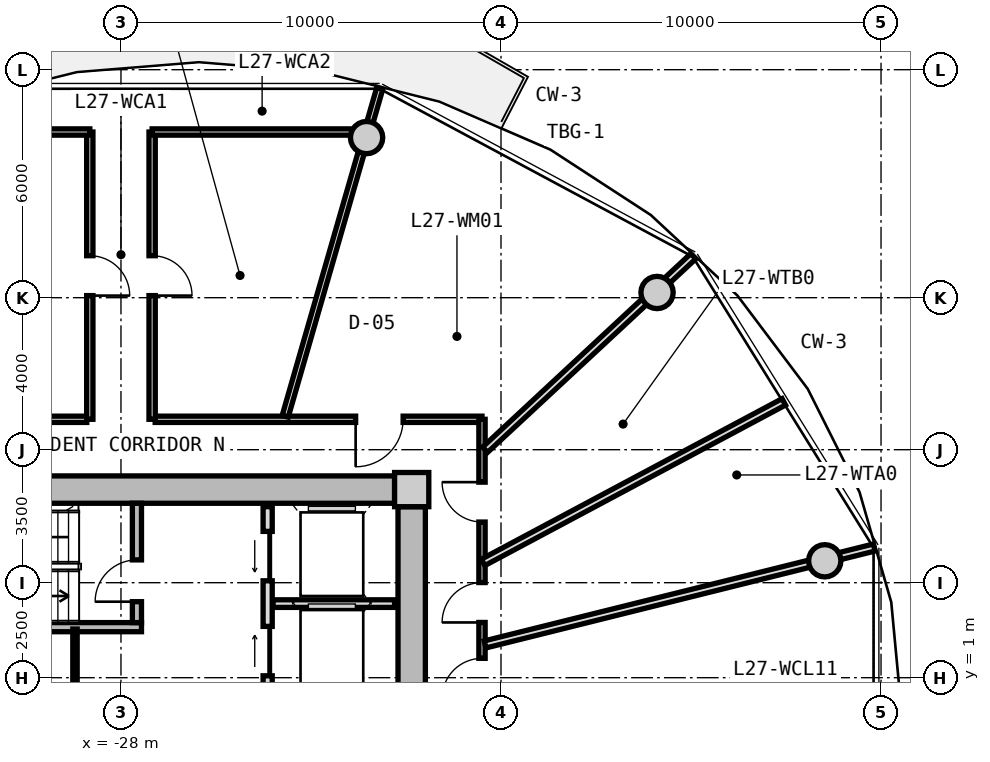
"""IFC4 building model, lengths in metres.
Left out: names, types, materials, properties, quantities, classifications, styles, units other than length and angle.
Written with IfcOpenShell. Run it as: python <this file> out.ifc"""

import sys

from ifc_helpers import new_model, si_unit, direction, frame, frame_2d, origin, origin_2d, place, context, subcontext, project, spatial, rectangle, circle, extrude, source, transform, mapped, element, fill, save


model = new_model("IFC4")
c1 = context("Model", 3, precision=1e-05, world=origin(), true_north=direction((0.0, 1.0)))
c2 = subcontext(c1, "Body", "Model", "MODEL_VIEW")
j1 = project(units=[si_unit("LENGTHUNIT", "METRE"), si_unit("PLANEANGLEUNIT", "RADIAN")], contexts=[c1])
p1 = place(None, origin())
s1 = spatial("IfcSite", under=j1, at=p1, CompositionType="ELEMENT")
p2 = place(p1, origin())
s2 = spatial("IfcBuilding", under=s1, at=p2, CompositionType="ELEMENT")
p3 = place(p2, frame((0.0, 0.0, 90.15)))
s3 = spatial("IfcBuildingStorey", under=s2, at=p3, CompositionType="ELEMENT", Elevation=90.15)
m1 = source(origin(), c2, "Body", "SweptSolid", [
    extrude(rectangle(XDim=0.9, YDim=0.9, at=origin_2d()), origin(), (0.0, 0.0, 1.0), 3.05),
])
p4 = place(p3, frame((-20.35, 5.95, 0.0), z_axis=(0.0, 0.0, 1.0), x_axis=(1.0, 0.0, 0.0)))
e1 = element("IfcColumn", 1, at=p4, inside=s3, PredefinedType="COLUMN", context=c2, shape_type="MappedRepresentation", body=[
    mapped(m1, transform((0.0, 0.0, 0.0), x_axis=(1.0, 0.0, 0.0), y_axis=(0.0, 1.0, 0.0), z_axis=(0.0, 0.0, 1.0), scale=1.0)),
])
m2 = source(origin(), c2, "Body", "SweptSolid", [
    extrude(rectangle(XDim=14.4, YDim=0.72, at=frame_2d((7.2, 0.0))), origin(), (0.0, 0.0, 1.0), 2.79),
])
p5 = place(p3, frame((-35.2, 5.95, 0.0), z_axis=(0.0, 0.0, 1.0), x_axis=(1.0, 0.0, 0.0)))
e2 = element("IfcWall", 2, at=p5, inside=s3, PredefinedType="SHEAR", context=c2, shape_type="MappedRepresentation", body=[
    mapped(m2, transform((0.0, 0.0, 0.0), x_axis=(1.0, 0.0, 0.0), y_axis=(0.0, 1.0, 0.0), z_axis=(0.0, 0.0, 1.0), scale=1.0)),
])
m3 = source(origin(), c2, "Body", "SweptSolid", [
    extrude(rectangle(XDim=11.0, YDim=0.72, at=frame_2d((5.5, 0.0))), origin(), (0.0, 0.0, 1.0), 2.79),
])
p6 = place(p3, frame((-20.35, 5.5, 0.0), z_axis=(0.0, 0.0, 1.0), x_axis=(0.0, -1.0, 0.0)))
e3 = element("IfcWall", 3, at=p6, inside=s3, PredefinedType="SHEAR", context=c2, shape_type="MappedRepresentation", body=[
    mapped(m3, transform((0.0, 0.0, 0.0), x_axis=(1.0, 0.0, 0.0), y_axis=(0.0, 1.0, 0.0), z_axis=(0.0, 0.0, 1.0), scale=1.0)),
])
p7 = place(p6, frame((5.65, 0.0, 0.0)))
e4 = element("IfcOpeningElement", 4, at=p7, cuts=e3, PredefinedType="OPENING", context=c2, shape_type="SweptSolid", body=[
    extrude(rectangle(XDim=1.2, YDim=2.15, at=frame_2d((0.6, 1.075))), frame((0.0, 0.37, 0.0), z_axis=(0.0, -1.0, 0.0), x_axis=(1.0, 0.0, 0.0)), (0.0, 0.0, 1.0), 0.74),
])
m4 = source(origin(), c2, "Body", "SweptSolid", [
    extrude(circle(Radius=0.425, at=origin_2d()), origin(), (0.0, 0.0, 1.0), 3.05),
])
for number, where, z_axis, x_axis in (
    (5, (-9.481, 4.076, 0.0), (0.0, 0.0, 1.0), (1.0, 0.0, 0.0)),
    (6, (-13.894, 11.137, 0.0), (0.0, 0.0, 1.0), (1.0, 0.0, 0.0)),
    (7, (-21.537, 15.213, 0.0), (0.0, 0.0, 1.0), (1.0, 0.0, 0.0)),
):
    element("IfcColumn", number, at=place(p3, frame(where, z_axis=z_axis, x_axis=x_axis)), inside=s3, PredefinedType="COLUMN", context=c2, shape_type="MappedRepresentation", body=[
        mapped(m4, transform((0.0, 0.0, 0.0), x_axis=(1.0, 0.0, 0.0), y_axis=(0.0, 1.0, 0.0), z_axis=(0.0, 0.0, 1.0), scale=1.0)),
    ])
m5 = source(origin(), c2, "Body", "SweptSolid", [
    extrude(rectangle(XDim=7.83, YDim=0.24, at=frame_2d((3.915, 0.0))), origin(), (0.0, 0.0, 1.0), 2.79),
])
p8 = place(p3, frame((-35.29, 2.33, 0.0), z_axis=(0.0, 0.0, 1.0), x_axis=(1.0, 0.0, 0.0)))
e8 = element("IfcWall", 8, at=p8, inside=s3, PredefinedType="PARTITIONING", context=c2, shape_type="MappedRepresentation", body=[
    mapped(m5, transform((0.0, 0.0, 0.0), x_axis=(1.0, 0.0, 0.0), y_axis=(0.0, 1.0, 0.0), z_axis=(0.0, 0.0, 1.0), scale=1.0)),
])
m6 = source(origin(), c2, "Body", "SweptSolid", [
    extrude(rectangle(XDim=3.14, YDim=0.24, at=frame_2d((1.57, 0.0))), origin(), (0.0, 0.0, 1.0), 2.79),
])
p9 = place(p3, frame((-27.58, 2.45, 0.0), z_axis=(0.0, 0.0, 1.0), x_axis=(0.0, 1.0, 0.0)))
e9 = element("IfcWall", 9, at=p9, inside=s3, PredefinedType="PARTITIONING", context=c2, shape_type="MappedRepresentation", body=[
    mapped(m6, transform((0.0, 0.0, 0.0), x_axis=(1.0, 0.0, 0.0), y_axis=(0.0, 1.0, 0.0), z_axis=(0.0, 0.0, 1.0), scale=1.0)),
])
p10 = place(p9, frame((0.55, 0.0, 0.0)))
e10 = element("IfcOpeningElement", 10, at=p10, cuts=e9, PredefinedType="OPENING", context=c2, shape_type="SweptSolid", body=[
    extrude(rectangle(XDim=1.1, YDim=2.15, at=frame_2d((0.55, 1.075))), frame((0.0, 0.13, 0.0), z_axis=(0.0, -1.0, 0.0), x_axis=(1.0, 0.0, 0.0)), (0.0, 0.0, 1.0), 0.26),
])
m7 = source(origin(), c2, "Body", "SweptSolid", [
    extrude(rectangle(XDim=5.0, YDim=0.24, at=frame_2d((2.5, 0.0))), origin(), (0.0, 0.0, 1.0), 2.775),
])
p11 = place(p3, frame((-24.14, 0.5, 0.0), z_axis=(0.0, 0.0, 1.0), x_axis=(0.0, 1.0, 0.0)))
e11 = element("IfcWall", 11, at=p11, inside=s3, PredefinedType="PARTITIONING", context=c2, shape_type="MappedRepresentation", body=[
    mapped(m7, transform((0.0, 0.0, 0.0), x_axis=(1.0, 0.0, 0.0), y_axis=(0.0, 1.0, 0.0), z_axis=(0.0, 0.0, 1.0), scale=1.0)),
])
p12 = place(p11, frame((3.05, 0.0, 0.0)))
e12 = element("IfcOpeningElement", 12, at=p12, cuts=e11, PredefinedType="OPENING", context=c2, shape_type="SweptSolid", body=[
    extrude(rectangle(XDim=1.3, YDim=2.2, at=frame_2d((0.65, 1.1))), frame((0.0, 0.13, 0.0), z_axis=(0.0, -1.0, 0.0), x_axis=(1.0, 0.0, 0.0)), (0.0, 0.0, 1.0), 0.26),
])
p13 = place(p11, frame((0.55, 0.0, 0.0)))
e13 = element("IfcOpeningElement", 13, at=p13, cuts=e11, PredefinedType="OPENING", context=c2, shape_type="SweptSolid", body=[
    extrude(rectangle(XDim=1.3, YDim=2.2, at=frame_2d((0.65, 1.1))), frame((0.0, 0.13, 0.0), z_axis=(0.0, -1.0, 0.0), x_axis=(1.0, 0.0, 0.0)), (0.0, 0.0, 1.0), 0.26),
])
m8 = source(origin(), c2, "Body", "SweptSolid", [
    extrude(rectangle(XDim=3.2, YDim=0.2, at=frame_2d((1.6, 0.0))), origin(), (0.0, 0.0, 1.0), 2.775),
])
p14 = place(p3, frame((-24.0, 2.95, 0.0), z_axis=(0.0, 0.0, 1.0), x_axis=(1.0, 0.0, 0.0)))
e14 = element("IfcWall", 14, at=p14, inside=s3, PredefinedType="PARTITIONING", context=c2, shape_type="MappedRepresentation", body=[
    mapped(m8, transform((0.0, 0.0, 0.0), x_axis=(1.0, 0.0, 0.0), y_axis=(0.0, 1.0, 0.0), z_axis=(0.0, 0.0, 1.0), scale=1.0)),
])
m9 = source(origin(), c2, "Body", "SweptSolid", [
    extrude(rectangle(XDim=2.33, YDim=0.115, at=frame_2d((1.165, 0.0))), origin(), (0.0, 0.0, 1.0), 2.775),
])
p15 = place(p3, frame((-29.21, -0.05, 0.0), z_axis=(0.0, 0.0, 1.0), x_axis=(0.0, 1.0, 0.0)))
e15 = element("IfcWall", 15, at=p15, inside=s3, PredefinedType="PARTITIONING", context=c2, shape_type="MappedRepresentation", body=[
    mapped(m9, transform((0.0, 0.0, 0.0), x_axis=(1.0, 0.0, 0.0), y_axis=(0.0, 1.0, 0.0), z_axis=(0.0, 0.0, 1.0), scale=1.0)),
])
m10 = source(origin(), c2, "Body", "SweptSolid", [
    extrude(rectangle(XDim=8.6, YDim=0.165, at=frame_2d((4.3, 0.0))), origin(), (0.0, 0.0, 1.0), 2.775),
])
p16 = place(p3, frame((-37.5, 7.8, 0.0), z_axis=(0.0, 0.0, 1.0), x_axis=(1.0, 0.0, 0.0)))
e16 = element("IfcWall", 16, at=p16, inside=s3, PredefinedType="PARTITIONING", context=c2, shape_type="MappedRepresentation", body=[
    mapped(m10, transform((0.0, 0.0, 0.0), x_axis=(1.0, 0.0, 0.0), y_axis=(0.0, 1.0, 0.0), z_axis=(0.0, 0.0, 1.0), scale=1.0)),
])
p17 = place(p3, frame((-27.1, 7.8, 0.0), z_axis=(0.0, 0.0, 1.0), x_axis=(1.0, 0.0, 0.0)))
e17 = element("IfcWall", 17, at=p17, inside=s3, PredefinedType="PARTITIONING", context=c2, shape_type="MappedRepresentation", body=[
    mapped(m10, transform((0.0, 0.0, 0.0), x_axis=(1.0, 0.0, 0.0), y_axis=(0.0, 1.0, 0.0), z_axis=(0.0, 0.0, 1.0), scale=1.0)),
])
p18 = place(p17, frame((5.275, 0.0, 0.0)))
e18 = element("IfcOpeningElement", 18, at=p18, cuts=e17, PredefinedType="OPENING", context=c2, shape_type="SweptSolid", body=[
    extrude(rectangle(XDim=1.25, YDim=2.2, at=frame_2d((0.625, 1.1))), frame((0.0, 0.093, 0.0), z_axis=(0.0, -1.0, 0.0), x_axis=(1.0, 0.0, 0.0)), (0.0, 0.0, 1.0), 0.185),
])
m11 = source(origin(), c2, "Body", "SweptSolid", [
    extrude(rectangle(XDim=15.6, YDim=0.165, at=frame_2d((7.8, 0.0))), origin(), (0.0, 0.0, 1.0), 2.775),
])
p19 = place(p3, frame((-18.5, 7.8, 0.0), z_axis=(0.0, 0.0, 1.0), x_axis=(0.0, -1.0, 0.0)))
e19 = element("IfcWall", 19, at=p19, inside=s3, PredefinedType="PARTITIONING", context=c2, shape_type="MappedRepresentation", body=[
    mapped(m11, transform((0.0, 0.0, 0.0), x_axis=(1.0, 0.0, 0.0), y_axis=(0.0, 1.0, 0.0), z_axis=(0.0, 0.0, 1.0), scale=1.0)),
])
p20 = place(p19, frame((12.002, 0.0, 0.0)))
e20 = element("IfcOpeningElement", 20, at=p20, cuts=e19, PredefinedType="OPENING", context=c2, shape_type="SweptSolid", body=[
    extrude(rectangle(XDim=1.05, YDim=2.15, at=frame_2d((0.525, 1.075))), frame((0.0, 0.093, 0.0), z_axis=(0.0, -1.0, 0.0), x_axis=(1.0, 0.0, 0.0)), (0.0, 0.0, 1.0), 0.185),
])
p21 = place(p19, frame((10.211, 0.0, 0.0)))
e21 = element("IfcOpeningElement", 21, at=p21, cuts=e19, PredefinedType="OPENING", context=c2, shape_type="SweptSolid", body=[
    extrude(rectangle(XDim=1.05, YDim=2.15, at=frame_2d((0.525, 1.075))), frame((0.0, 0.093, 0.0), z_axis=(0.0, -1.0, 0.0), x_axis=(1.0, 0.0, 0.0)), (0.0, 0.0, 1.0), 0.185),
])
p22 = place(p19, frame((7.722, 0.0, 0.0)))
e22 = element("IfcOpeningElement", 22, at=p22, cuts=e19, PredefinedType="OPENING", context=c2, shape_type="SweptSolid", body=[
    extrude(rectangle(XDim=1.05, YDim=2.15, at=frame_2d((0.525, 1.075))), frame((0.0, 0.093, 0.0), z_axis=(0.0, -1.0, 0.0), x_axis=(1.0, 0.0, 0.0)), (0.0, 0.0, 1.0), 0.185),
])
p23 = place(p19, frame((6.291, 0.0, 0.0)))
e23 = element("IfcOpeningElement", 23, at=p23, cuts=e19, PredefinedType="OPENING", context=c2, shape_type="SweptSolid", body=[
    extrude(rectangle(XDim=1.05, YDim=2.15, at=frame_2d((0.525, 1.075))), frame((0.0, 0.093, 0.0), z_axis=(0.0, -1.0, 0.0), x_axis=(1.0, 0.0, 0.0)), (0.0, 0.0, 1.0), 0.185),
])
p24 = place(p19, frame((4.296, 0.0, 0.0)))
e24 = element("IfcOpeningElement", 24, at=p24, cuts=e19, PredefinedType="OPENING", context=c2, shape_type="SweptSolid", body=[
    extrude(rectangle(XDim=1.05, YDim=2.15, at=frame_2d((0.525, 1.075))), frame((0.0, 0.093, 0.0), z_axis=(0.0, -1.0, 0.0), x_axis=(1.0, 0.0, 0.0)), (0.0, 0.0, 1.0), 0.185),
])
p25 = place(p19, frame((1.654, 0.0, 0.0)))
e25 = element("IfcOpeningElement", 25, at=p25, cuts=e19, PredefinedType="OPENING", context=c2, shape_type="SweptSolid", body=[
    extrude(rectangle(XDim=1.05, YDim=2.15, at=frame_2d((0.525, 1.075))), frame((0.0, 0.093, 0.0), z_axis=(0.0, -1.0, 0.0), x_axis=(1.0, 0.0, 0.0)), (0.0, 0.0, 1.0), 0.185),
])
m12 = source(origin(), c2, "Body", "SweptSolid", [
    extrude(rectangle(XDim=8.989, YDim=0.165, at=frame_2d((4.495, 0.0))), origin(), (0.0, 0.0, 1.0), 2.275),
])
p26 = place(p3, frame((-23.678, 7.88, 0.0), z_axis=(0.0, 0.0, 1.0), x_axis=(0.27702323008, 0.960863221274, 0.0)))
e26 = element("IfcWall", 26, at=p26, inside=s3, PredefinedType="PARTITIONING", context=c2, shape_type="MappedRepresentation", body=[
    mapped(m12, transform((0.0, 0.0, 0.0), x_axis=(1.0, 0.0, 0.0), y_axis=(0.0, 1.0, 0.0), z_axis=(0.0, 0.0, 1.0), scale=1.0)),
])
m13 = source(origin(), c2, "Body", "SweptSolid", [
    extrude(rectangle(XDim=7.56, YDim=0.165, at=frame_2d((3.78, 0.0))), origin(), (0.0, 0.0, 1.0), 2.775),
])
p27 = place(p3, frame((-28.82, 7.8, 0.0), z_axis=(0.0, 0.0, 1.0), x_axis=(0.0, 1.0, 0.0)))
e27 = element("IfcWall", 27, at=p27, inside=s3, PredefinedType="PARTITIONING", context=c2, shape_type="MappedRepresentation", body=[
    mapped(m13, transform((0.0, 0.0, 0.0), x_axis=(1.0, 0.0, 0.0), y_axis=(0.0, 1.0, 0.0), z_axis=(0.0, 0.0, 1.0), scale=1.0)),
])
p28 = place(p27, frame((3.255, 0.0, 0.0)))
e28 = element("IfcOpeningElement", 28, at=p28, cuts=e27, PredefinedType="OPENING", context=c2, shape_type="SweptSolid", body=[
    extrude(rectangle(XDim=1.05, YDim=2.15, at=frame_2d((0.525, 1.075))), frame((0.0, 0.093, 0.0), z_axis=(0.0, -1.0, 0.0), x_axis=(1.0, 0.0, 0.0)), (0.0, 0.0, 1.0), 0.185),
])
m14 = source(origin(), c2, "Body", "SweptSolid", [
    extrude(rectangle(XDim=4.307, YDim=0.165, at=frame_2d((2.153, 0.0))), origin(), (0.0, 0.0, 1.0), 2.275),
])
p29 = place(p3, frame((-33.127, 15.36, 0.0), z_axis=(0.0, 0.0, 1.0), x_axis=(1.0, 0.0, 0.0)))
e29 = element("IfcWall", 29, at=p29, inside=s3, PredefinedType="PARTITIONING", context=c2, shape_type="MappedRepresentation", body=[
    mapped(m14, transform((0.0, 0.0, 0.0), x_axis=(1.0, 0.0, 0.0), y_axis=(0.0, 1.0, 0.0), z_axis=(0.0, 0.0, 1.0), scale=1.0)),
])
p30 = place(p3, frame((-27.18, 7.8, 0.0), z_axis=(0.0, 0.0, 1.0), x_axis=(0.0, 1.0, 0.0)))
e30 = element("IfcWall", 30, at=p30, inside=s3, PredefinedType="PARTITIONING", context=c2, shape_type="MappedRepresentation", body=[
    mapped(m13, transform((0.0, 0.0, 0.0), x_axis=(1.0, 0.0, 0.0), y_axis=(0.0, 1.0, 0.0), z_axis=(0.0, 0.0, 1.0), scale=1.0)),
])
p31 = place(p30, frame((3.255, 0.0, 0.0)))
e31 = element("IfcOpeningElement", 31, at=p31, cuts=e30, PredefinedType="OPENING", context=c2, shape_type="SweptSolid", body=[
    extrude(rectangle(XDim=1.05, YDim=2.15, at=frame_2d((0.525, 1.075))), frame((0.0, 0.093, 0.0), z_axis=(0.0, -1.0, 0.0), x_axis=(1.0, 0.0, 0.0)), (0.0, 0.0, 1.0), 0.185),
])
m15 = source(origin(), c2, "Body", "SweptSolid", [
    extrude(rectangle(XDim=5.814, YDim=0.165, at=frame_2d((2.907, 0.0))), origin(), (0.0, 0.0, 1.0), 2.275),
])
p32 = place(p3, frame((-27.18, 15.36, 0.0), z_axis=(0.0, 0.0, 1.0), x_axis=(1.0, 0.0, 0.0)))
e32 = element("IfcWall", 32, at=p32, inside=s3, PredefinedType="PARTITIONING", context=c2, shape_type="MappedRepresentation", body=[
    mapped(m15, transform((0.0, 0.0, 0.0), x_axis=(1.0, 0.0, 0.0), y_axis=(0.0, 1.0, 0.0), z_axis=(0.0, 0.0, 1.0), scale=1.0)),
])
m16 = source(origin(), c2, "Body", "SweptSolid", [
    extrude(rectangle(XDim=10.556, YDim=0.19, at=frame_2d((5.278, 0.0))), origin(), (0.0, 0.0, 1.0), 2.275),
])
p33 = place(p3, frame((-18.42, 1.875, 0.0), z_axis=(0.0, 0.0, 1.0), x_axis=(0.970363857851, 0.241648470667, 0.0)))
e33 = element("IfcWall", 33, at=p33, inside=s3, PredefinedType="PARTITIONING", context=c2, shape_type="MappedRepresentation", body=[
    mapped(m16, transform((0.0, 0.0, 0.0), x_axis=(1.0, 0.0, 0.0), y_axis=(0.0, 1.0, 0.0), z_axis=(0.0, 0.0, 1.0), scale=1.0)),
])
m17 = source(origin(), c2, "Body", "SweptSolid", [
    extrude(rectangle(XDim=7.482, YDim=0.19, at=frame_2d((3.741, 0.0))), origin(), (0.0, 0.0, 1.0), 2.275),
])
p34 = place(p3, frame((-18.42, 6.998, 0.0), z_axis=(0.0, 0.0, 1.0), x_axis=(0.732508698043, 0.680757671489, 0.0)))
e34 = element("IfcWall", 34, at=p34, inside=s3, PredefinedType="PARTITIONING", context=c2, shape_type="MappedRepresentation", body=[
    mapped(m17, transform((0.0, 0.0, 0.0), x_axis=(1.0, 0.0, 0.0), y_axis=(0.0, 1.0, 0.0), z_axis=(0.0, 0.0, 1.0), scale=1.0)),
])
m18 = source(origin(), c2, "Body", "SweptSolid", [
    extrude(rectangle(XDim=8.968, YDim=0.19, at=frame_2d((4.484, 0.0))), origin(), (0.0, 0.0, 1.0), 2.775),
])
p35 = place(p3, frame((-18.47, 4.036, 0.0), z_axis=(0.0, 0.0, 1.0), x_axis=(0.882202936563, 0.47086938605, 0.0)))
e35 = element("IfcWall", 35, at=p35, inside=s3, PredefinedType="PARTITIONING", context=c2, shape_type="MappedRepresentation", body=[
    mapped(m18, transform((0.0, 0.0, 0.0), x_axis=(1.0, 0.0, 0.0), y_axis=(0.0, 1.0, 0.0), z_axis=(0.0, 0.0, 1.0), scale=1.0)),
])
m19 = source(origin(), c2, "Body", "SweptSolid", [
    extrude(rectangle(XDim=1.1, YDim=2.15, at=frame_2d((0.55, 1.075))), frame((0.0, 0.025, 0.0), z_axis=(0.0, -1.0, 0.0), x_axis=(1.0, 0.0, 0.0)), (0.0, 0.0, 1.0), 0.05),
])
p36 = place(p10, origin())
e36 = element("IfcDoor", 36, at=p36, inside=s3, OperationType="SINGLE_SWING_LEFT", PredefinedType="DOOR", context=c2, shape_type="MappedRepresentation", body=[
    mapped(m19, transform((0.0, 0.0, 0.0), x_axis=(1.0, 0.0, 0.0), y_axis=(0.0, 1.0, 0.0), z_axis=(0.0, 0.0, 1.0), scale=1.0)),
])
fill(e10, e36)
m20 = source(origin(), c2, "Body", "SweptSolid", [
    extrude(rectangle(XDim=1.3, YDim=2.2, at=frame_2d((0.65, 1.1))), frame((0.0, 0.025, 0.0), z_axis=(0.0, -1.0, 0.0), x_axis=(1.0, 0.0, 0.0)), (0.0, 0.0, 1.0), 0.05),
])
p37 = place(p12, origin())
e37 = element("IfcDoor", 37, at=p37, inside=s3, OperationType="SLIDING_TO_LEFT", PredefinedType="DOOR", context=c2, shape_type="MappedRepresentation", body=[
    mapped(m20, transform((0.0, 0.0, 0.0), x_axis=(1.0, 0.0, 0.0), y_axis=(0.0, 1.0, 0.0), z_axis=(0.0, 0.0, 1.0), scale=1.0)),
])
fill(e12, e37)
p38 = place(p13, origin())
e38 = element("IfcDoor", 38, at=p38, inside=s3, OperationType="SLIDING_TO_RIGHT", PredefinedType="DOOR", context=c2, shape_type="MappedRepresentation", body=[
    mapped(m20, transform((0.0, 0.0, 0.0), x_axis=(1.0, 0.0, 0.0), y_axis=(0.0, 1.0, 0.0), z_axis=(0.0, 0.0, 1.0), scale=1.0)),
])
fill(e13, e38)
m21 = source(origin(), c2, "Body", "SweptSolid", [
    extrude(rectangle(XDim=1.05, YDim=2.15, at=frame_2d((0.525, 1.075))), frame((0.0, 0.025, 0.0), z_axis=(0.0, -1.0, 0.0), x_axis=(1.0, 0.0, 0.0)), (0.0, 0.0, 1.0), 0.05),
])
p39 = place(p28, frame((1.05, 0.0, 0.0), z_axis=(0.0, 0.0, 1.0), x_axis=(-1.0, 0.0, 0.0)))
e39 = element("IfcDoor", 39, at=p39, inside=s3, OperationType="SINGLE_SWING_RIGHT", PredefinedType="DOOR", context=c2, shape_type="MappedRepresentation", body=[
    mapped(m21, transform((0.0, 0.0, 0.0), x_axis=(1.0, 0.0, 0.0), y_axis=(0.0, 1.0, 0.0), z_axis=(0.0, 0.0, 1.0), scale=1.0)),
])
fill(e28, e39)
p40 = place(p31, frame((1.05, 0.0, 0.0), z_axis=(0.0, 0.0, 1.0), x_axis=(-1.0, 0.0, 0.0)))
e40 = element("IfcDoor", 40, at=p40, inside=s3, OperationType="SINGLE_SWING_RIGHT", PredefinedType="DOOR", context=c2, shape_type="MappedRepresentation", body=[
    mapped(m21, transform((0.0, 0.0, 0.0), x_axis=(1.0, 0.0, 0.0), y_axis=(0.0, 1.0, 0.0), z_axis=(0.0, 0.0, 1.0), scale=1.0)),
])
fill(e31, e40)
p41 = place(p23, frame((1.05, 0.0, 0.0), z_axis=(0.0, 0.0, 1.0), x_axis=(-1.0, 0.0, 0.0)))
e41 = element("IfcDoor", 41, at=p41, inside=s3, OperationType="SINGLE_SWING_LEFT", PredefinedType="DOOR", context=c2, shape_type="MappedRepresentation", body=[
    mapped(m21, transform((0.0, 0.0, 0.0), x_axis=(1.0, 0.0, 0.0), y_axis=(0.0, 1.0, 0.0), z_axis=(0.0, 0.0, 1.0), scale=1.0)),
])
fill(e23, e41)
p42 = place(p24, frame((1.05, 0.0, 0.0), z_axis=(0.0, 0.0, 1.0), x_axis=(-1.0, 0.0, 0.0)))
e42 = element("IfcDoor", 42, at=p42, inside=s3, OperationType="SINGLE_SWING_LEFT", PredefinedType="DOOR", context=c2, shape_type="MappedRepresentation", body=[
    mapped(m21, transform((0.0, 0.0, 0.0), x_axis=(1.0, 0.0, 0.0), y_axis=(0.0, 1.0, 0.0), z_axis=(0.0, 0.0, 1.0), scale=1.0)),
])
fill(e24, e42)
p43 = place(p25, frame((1.05, 0.0, 0.0), z_axis=(0.0, 0.0, 1.0), x_axis=(-1.0, 0.0, 0.0)))
e43 = element("IfcDoor", 43, at=p43, inside=s3, OperationType="SINGLE_SWING_RIGHT", PredefinedType="DOOR", context=c2, shape_type="MappedRepresentation", body=[
    mapped(m21, transform((0.0, 0.0, 0.0), x_axis=(1.0, 0.0, 0.0), y_axis=(0.0, 1.0, 0.0), z_axis=(0.0, 0.0, 1.0), scale=1.0)),
])
fill(e25, e43)
m22 = source(origin(), c2, "Body", "SweptSolid", [
    extrude(rectangle(XDim=1.25, YDim=2.2, at=frame_2d((0.625, 1.1))), frame((0.0, 0.025, 0.0), z_axis=(0.0, -1.0, 0.0), x_axis=(1.0, 0.0, 0.0)), (0.0, 0.0, 1.0), 0.05),
])
p44 = place(p18, frame((1.25, 0.0, 0.0), z_axis=(0.0, 0.0, 1.0), x_axis=(-1.0, 0.0, 0.0)))
e44 = element("IfcDoor", 44, at=p44, inside=s3, OperationType="SINGLE_SWING_RIGHT", PredefinedType="DOOR", context=c2, shape_type="MappedRepresentation", body=[
    mapped(m22, transform((0.0, 0.0, 0.0), x_axis=(1.0, 0.0, 0.0), y_axis=(0.0, 1.0, 0.0), z_axis=(0.0, 0.0, 1.0), scale=1.0)),
])
fill(e18, e44)
save(model, sys.argv[1])
